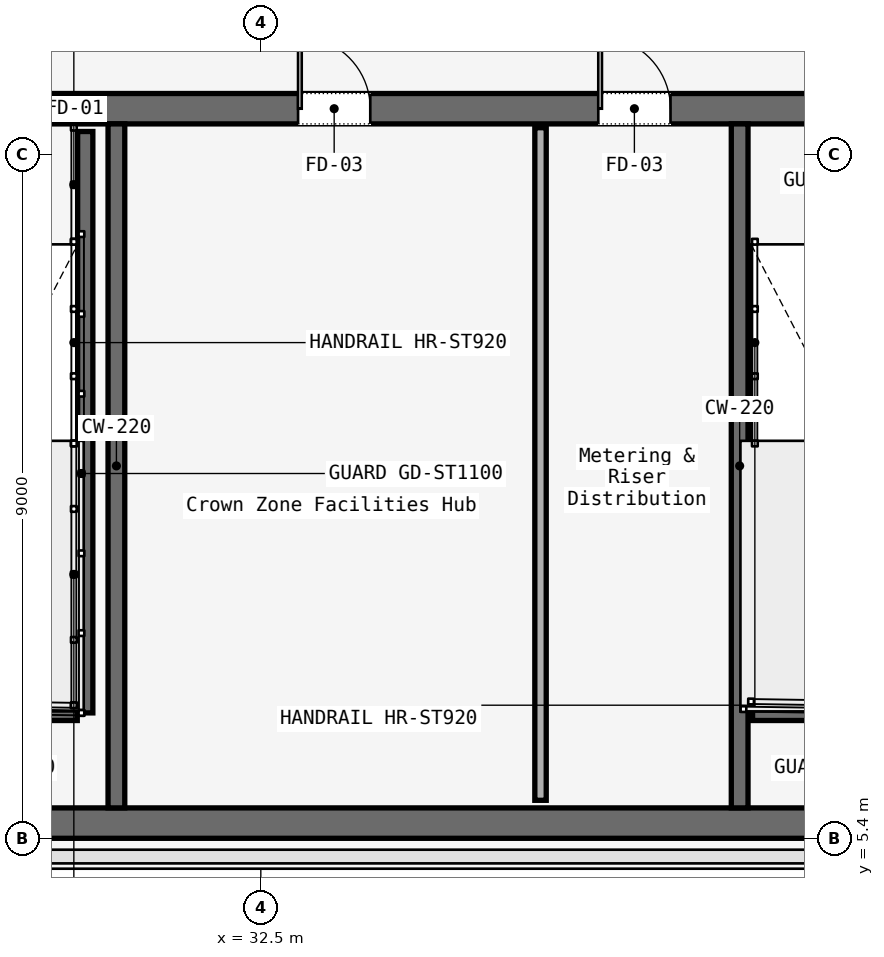
"""IFC4 building model, lengths in metres.
Left out: names, types, materials, properties, quantities, classifications, styles, units other than length and angle.
Written with IfcOpenShell. Run it as: python <this file> out.ifc"""

import sys

from ifc_helpers import new_model, si_unit, direction, frame, frame_2d, origin, place, context, subcontext, project, spatial, rectangle, extrude, element, fill, save


model = new_model("IFC4")
c1 = context("Model", 3, precision=1e-05, world=origin(), true_north=direction((0.0, 1.0)))
c2 = subcontext(c1, "Body", "Model", "MODEL_VIEW")
j1 = project(units=[si_unit("LENGTHUNIT", "METRE"), si_unit("PLANEANGLEUNIT", "RADIAN")], contexts=[c1])
p1 = place(None, origin())
s1 = spatial("IfcSite", under=j1, at=p1, CompositionType="ELEMENT")
p2 = place(p1, origin())
s2 = spatial("IfcBuilding", under=s1, at=p2, CompositionType="ELEMENT")
p3 = place(p2, frame((0.0, 0.0, 283.3)))
s3 = spatial("IfcBuildingStorey", under=s2, at=p3, CompositionType="ELEMENT", Elevation=283.3)
p4 = place(p3, frame((26.45, 15.0, 0.0), z_axis=(0.0, 0.0, 1.0), x_axis=(1.0, 0.0, 0.0)))
e1 = element("IfcWall", 1, at=p4, inside=s3, PredefinedType="SOLIDWALL", context=c2, shape_type="SweptSolid", body=[
    extrude(rectangle(XDim=31.1, YDim=0.4, at=frame_2d((15.55, 0.0))), origin(), (0.0, 0.0, 1.0), 3.58),
])
p5 = place(p4, frame((1.65, 0.0, 0.0)))
e2 = element("IfcOpeningElement", 2, at=p5, cuts=e1, PredefinedType="OPENING", context=c2, shape_type="SweptSolid", body=[
    extrude(rectangle(XDim=1.1, YDim=2.2, at=frame_2d((0.55, 1.1))), frame((0.0, 0.2, 0.0), z_axis=(0.0, -1.0, 0.0), x_axis=(1.0, 0.0, 0.0)), (0.0, 0.0, 1.0), 0.4),
])
p6 = place(p4, frame((13.65, 0.0, 0.0)))
e3 = element("IfcOpeningElement", 3, at=p6, cuts=e1, PredefinedType="OPENING", context=c2, shape_type="SweptSolid", body=[
    extrude(rectangle(XDim=1.1, YDim=2.2, at=frame_2d((0.55, 1.1))), frame((0.0, 0.2, 0.0), z_axis=(0.0, -1.0, 0.0), x_axis=(1.0, 0.0, 0.0)), (0.0, 0.0, 1.0), 0.4),
])
p7 = place(p4, frame((25.55, 0.0, 0.0)))
e4 = element("IfcOpeningElement", 4, at=p7, cuts=e1, PredefinedType="OPENING", context=c2, shape_type="SweptSolid", body=[
    extrude(rectangle(XDim=1.1, YDim=2.2, at=frame_2d((0.55, 1.1))), frame((0.0, 0.2, 0.0), z_axis=(0.0, -1.0, 0.0), x_axis=(1.0, 0.0, 0.0)), (0.0, 0.0, 1.0), 0.4),
])
p8 = place(p4, frame((19.35, 0.0, 0.0)))
e5 = element("IfcOpeningElement", 5, at=p8, cuts=e1, PredefinedType="OPENING", context=c2, shape_type="SweptSolid", body=[
    extrude(rectangle(XDim=1.1, YDim=2.2, at=frame_2d((0.55, 1.1))), frame((0.0, 0.2, 0.0), z_axis=(0.0, -1.0, 0.0), x_axis=(1.0, 0.0, 0.0)), (0.0, 0.0, 1.0), 0.4),
])
p9 = place(p4, frame((21.4, 0.0, 0.0)))
e6 = element("IfcOpeningElement", 6, at=p9, cuts=e1, PredefinedType="OPENING", context=c2, shape_type="SweptSolid", body=[
    extrude(rectangle(XDim=0.9, YDim=2.1, at=frame_2d((0.45, 1.05))), frame((0.0, 0.2, 0.0), z_axis=(0.0, -1.0, 0.0), x_axis=(1.0, 0.0, 0.0)), (0.0, 0.0, 1.0), 0.4),
])
p10 = place(p4, frame((6.54, 0.0, 0.0)))
e7 = element("IfcOpeningElement", 7, at=p10, cuts=e1, PredefinedType="OPENING", context=c2, shape_type="SweptSolid", body=[
    extrude(rectangle(XDim=0.95, YDim=2.2, at=frame_2d((0.475, 1.1))), frame((0.0, 0.2, 0.0), z_axis=(0.0, -1.0, 0.0), x_axis=(1.0, 0.0, 0.0)), (0.0, 0.0, 1.0), 0.4),
])
p11 = place(p4, frame((10.49, 0.0, 0.0)))
e8 = element("IfcOpeningElement", 8, at=p11, cuts=e1, PredefinedType="OPENING", context=c2, shape_type="SweptSolid", body=[
    extrude(rectangle(XDim=0.95, YDim=2.2, at=frame_2d((0.475, 1.1))), frame((0.0, 0.2, 0.0), z_axis=(0.0, -1.0, 0.0), x_axis=(1.0, 0.0, 0.0)), (0.0, 0.0, 1.0), 0.4),
])
p12 = place(p4, frame((23.35, 0.0, 0.0)))
e9 = element("IfcOpeningElement", 9, at=p12, cuts=e1, PredefinedType="OPENING", context=c2, shape_type="SweptSolid", body=[
    extrude(rectangle(XDim=1.3, YDim=2.3, at=frame_2d((0.65, 1.15))), frame((0.0, 0.2, 0.0), z_axis=(0.0, -1.0, 0.0), x_axis=(1.0, 0.0, 0.0)), (0.0, 0.0, 1.0), 0.4),
])
p13 = place(p3, frame((26.45, 5.6, 0.0), z_axis=(0.0, 0.0, 1.0), x_axis=(1.0, 0.0, 0.0)))
e10 = element("IfcWall", 10, at=p13, inside=s3, PredefinedType="SOLIDWALL", context=c2, shape_type="SweptSolid", body=[
    extrude(rectangle(XDim=31.1, YDim=0.4, at=frame_2d((15.55, 0.0))), origin(), (0.0, 0.0, 1.0), 3.58),
])
for number, where, z_axis, x_axis in (
    (11, (30.6, 5.8, 0.0), (0.0, 0.0, 1.0), (0.0, 1.0, 0.0)),
    (12, (38.8, 5.8, 0.0), (0.0, 0.0, 1.0), (0.0, 1.0, 0.0)),
):
    element("IfcWall", number, at=place(p3, frame(where, z_axis=z_axis, x_axis=x_axis)), inside=s3, PredefinedType="SOLIDWALL", context=c2, shape_type="SweptSolid", body=[
        extrude(rectangle(XDim=9.0, YDim=0.22, at=frame_2d((4.5, 0.0))), origin(), (0.0, 0.0, 1.0), 3.58),
    ])
p14 = place(p3, frame((30.19, 14.7, 0.0), z_axis=(0.0, 0.0, 1.0), x_axis=(0.0, -1.0, 0.0)))
e13 = element("IfcWall", 13, at=p14, inside=s3, PredefinedType="SOLIDWALL", context=c2, shape_type="SweptSolid", body=[
    extrude(rectangle(XDim=7.65, YDim=0.2, at=frame_2d((3.825, 0.0))), origin(), (0.0, 0.0, 1.0), 3.8),
])
for number, where, z_axis, x_axis in (
    (14, (26.97, 7.05, 0.0), (0.0, 0.0, 1.0), (1.0, 0.0, 0.0)),
    (15, (38.97, 7.05, 0.0), (0.0, 0.0, 1.0), (1.0, 0.0, 0.0)),
):
    element("IfcWall", number, at=place(p3, frame(where, z_axis=z_axis, x_axis=x_axis)), inside=s3, PredefinedType="SOLIDWALL", context=c2, shape_type="SweptSolid", body=[
        extrude(rectangle(XDim=3.115, YDim=0.2, at=frame_2d((1.558, 0.0))), origin(), (0.0, 0.0, 1.0), 3.8),
    ])
p15 = place(p3, frame((36.18, 5.9, 0.0), z_axis=(0.0, 0.0, 1.0), x_axis=(0.0, 1.0, 0.0)))
e16 = element("IfcWall", 16, at=p15, inside=s3, PredefinedType="PARTITIONING", context=c2, shape_type="SweptSolid", body=[
    extrude(rectangle(XDim=8.85, YDim=0.15, at=frame_2d((4.425, 0.0))), origin(), (0.0, 0.0, 1.0), 3.01),
])
p16 = place(p10, origin())
e17 = element("IfcDoor", 17, at=p16, inside=s3, OperationType="SINGLE_SWING_LEFT", PredefinedType="DOOR", context=c2, shape_type="SweptSolid", body=[
    extrude(rectangle(XDim=0.95, YDim=2.2, at=frame_2d((0.475, 1.1))), frame((0.0, 0.025, 0.0), z_axis=(0.0, -1.0, 0.0), x_axis=(1.0, 0.0, 0.0)), (0.0, 0.0, 1.0), 0.05),
])
fill(e7, e17)
p17 = place(p11, origin())
e18 = element("IfcDoor", 18, at=p17, inside=s3, OperationType="SINGLE_SWING_RIGHT", PredefinedType="DOOR", context=c2, shape_type="SweptSolid", body=[
    extrude(rectangle(XDim=0.95, YDim=2.2, at=frame_2d((0.475, 1.1))), frame((0.0, 0.025, 0.0), z_axis=(0.0, -1.0, 0.0), x_axis=(1.0, 0.0, 0.0)), (0.0, 0.0, 1.0), 0.05),
])
fill(e8, e18)
save(model, sys.argv[1])
